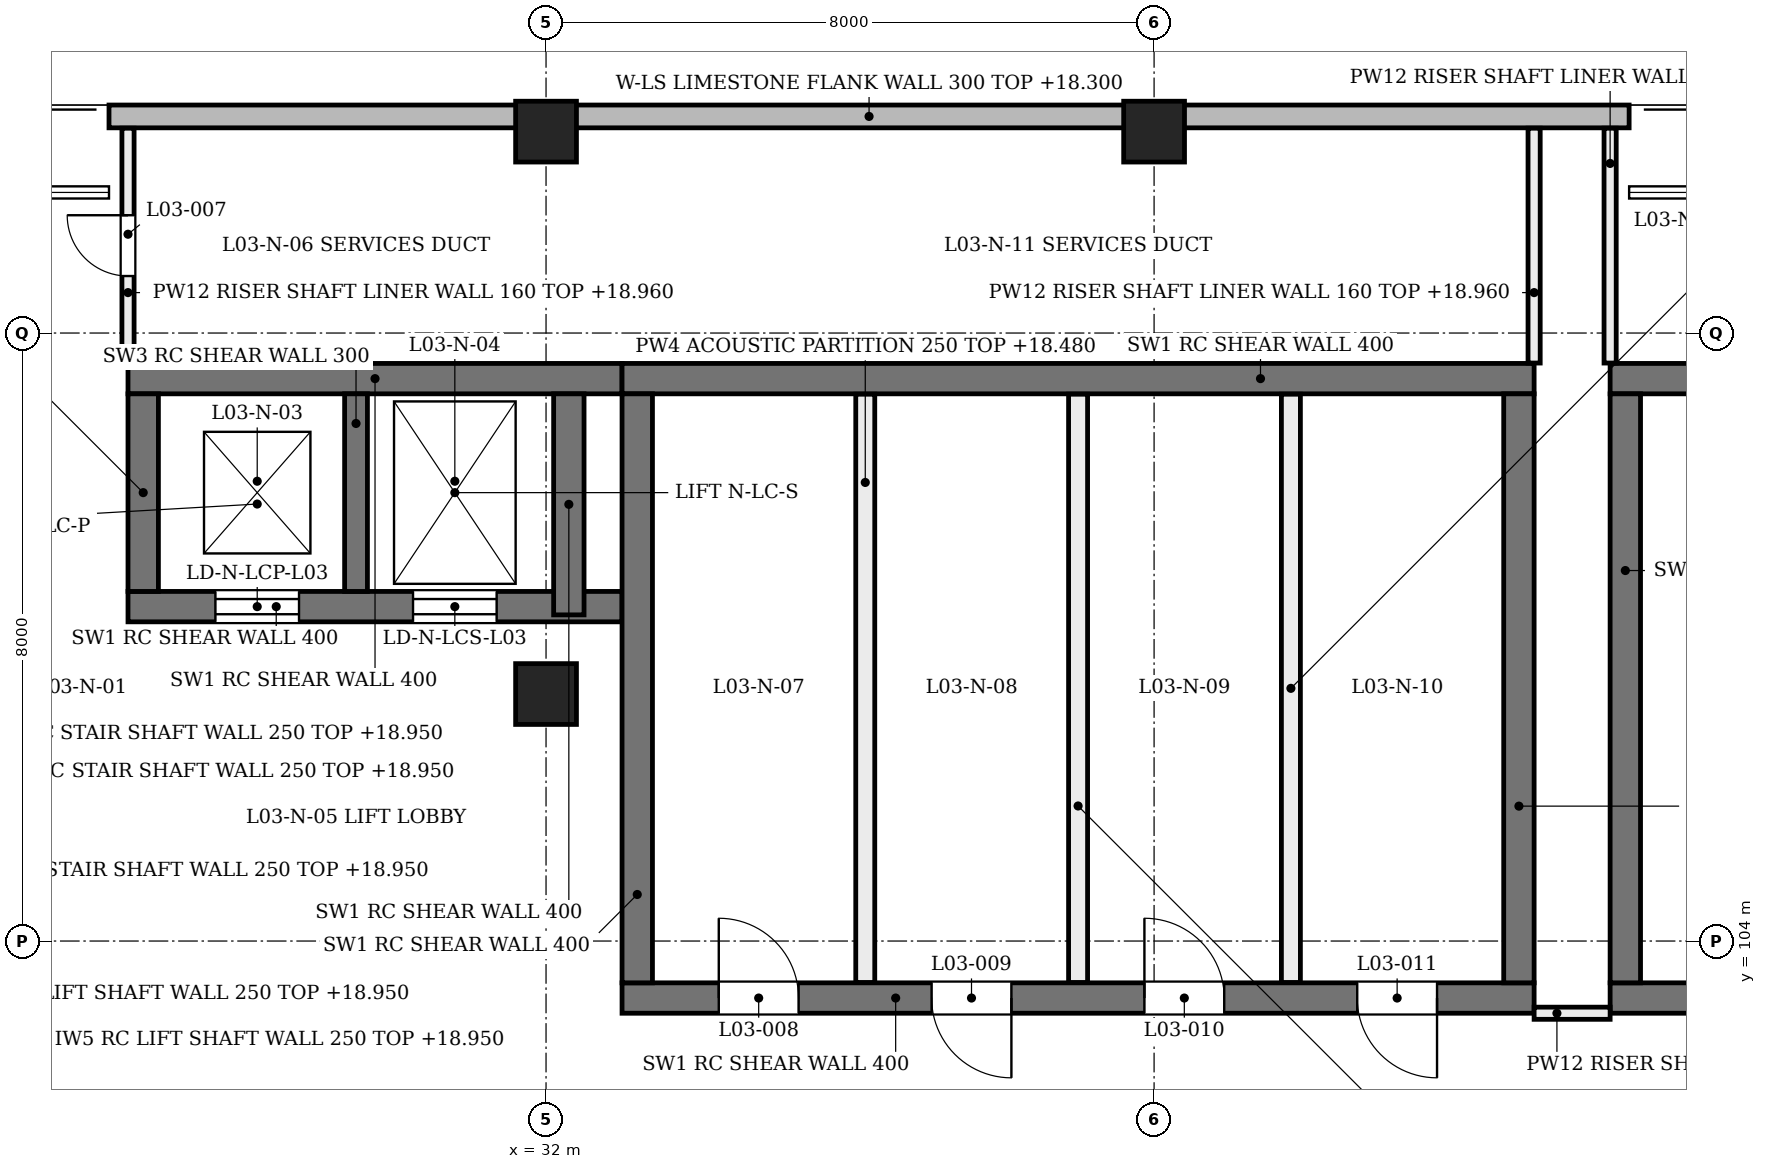
"""IFC4 building model, lengths in metres.
Left out: names, types, materials, properties, quantities, classifications, styles, units other than length and angle.
Written with IfcOpenShell. Run it as: python <this file> out.ifc"""

import sys

from ifc_helpers import new_model, si_unit, direction, frame, frame_2d, origin, origin_2d, place, context, subcontext, project, spatial, rectangle, extrude, element, fill, save


model = new_model("IFC4")
c1 = context("Model", 3, precision=1e-05, world=origin(), true_north=direction((0.0, 1.0)))
c2 = subcontext(c1, "Body", "Model", "MODEL_VIEW")
j1 = project(units=[si_unit("LENGTHUNIT", "METRE"), si_unit("PLANEANGLEUNIT", "RADIAN")], contexts=[c1])
p1 = place(None, origin())
s1 = spatial("IfcSite", under=j1, at=p1, CompositionType="ELEMENT")
p2 = place(p1, origin())
s2 = spatial("IfcBuilding", under=s1, at=p2, CompositionType="ELEMENT")
p3 = place(p2, frame((0.0, 0.0, 14.4)))
s3 = spatial("IfcBuildingStorey", under=s2, at=p3, CompositionType="ELEMENT", Elevation=14.4)
p4 = place(p3, frame((26.5, 108.4, 0.0), z_axis=(0.0, 0.0, 1.0), x_axis=(1.0, 0.0, 0.0)))
e1 = element("IfcWall", 1, at=p4, inside=s3, PredefinedType="SHEAR", context=c2, shape_type="SweptSolid", body=[
    extrude(rectangle(XDim=6.5, YDim=0.4, at=frame_2d((3.25, 0.0))), origin(), (0.0, 0.0, 1.0), 4.58),
])
p5 = place(p4, frame((1.15, 0.0, 0.0)))
e2 = element("IfcOpeningElement", 2, at=p5, cuts=e1, PredefinedType="OPENING", context=c2, shape_type="SweptSolid", body=[
    extrude(rectangle(XDim=1.1, YDim=2.1, at=frame_2d((0.55, 1.05))), frame((0.0, 0.21, 0.0), z_axis=(0.0, -1.0, 0.0), x_axis=(1.0, 0.0, 0.0)), (0.0, 0.0, 1.0), 0.42),
])
p6 = place(p4, frame((3.75, 0.0, 0.0)))
e3 = element("IfcOpeningElement", 3, at=p6, cuts=e1, PredefinedType="OPENING", context=c2, shape_type="SweptSolid", body=[
    extrude(rectangle(XDim=1.1, YDim=2.1, at=frame_2d((0.55, 1.05))), frame((0.0, 0.21, 0.0), z_axis=(0.0, -1.0, 0.0), x_axis=(1.0, 0.0, 0.0)), (0.0, 0.0, 1.0), 0.42),
])
p7 = place(p3, frame((26.5, 111.4, 0.0), z_axis=(0.0, 0.0, 1.0), x_axis=(1.0, 0.0, 0.0)))
e4 = element("IfcWall", 4, at=p7, inside=s3, PredefinedType="SHEAR", context=c2, shape_type="SweptSolid", body=[
    extrude(rectangle(XDim=6.5, YDim=0.4, at=frame_2d((3.25, 0.0))), origin(), (0.0, 0.0, 1.0), 4.58),
])
p8 = place(p3, frame((26.7, 108.6, 0.0), z_axis=(0.0, 0.0, 1.0), x_axis=(0.0, 1.0, 0.0)))
e5 = element("IfcWall", 5, at=p8, inside=s3, PredefinedType="SHEAR", context=c2, shape_type="SweptSolid", body=[
    extrude(rectangle(XDim=2.6, YDim=0.4, at=frame_2d((1.3, 0.0))), origin(), (0.0, 0.0, 1.0), 4.58),
])
p9 = place(p3, frame((32.3, 108.292, 0.0), z_axis=(0.0, 0.0, 1.0), x_axis=(0.0, 1.0, 0.0)))
e6 = element("IfcWall", 6, at=p9, inside=s3, PredefinedType="SHEAR", context=c2, shape_type="SweptSolid", body=[
    extrude(rectangle(XDim=2.908, YDim=0.4, at=frame_2d((1.454, 0.0))), origin(), (0.0, 0.0, 1.0), 4.58),
])
p10 = place(p3, frame((29.5, 108.6, 0.0), z_axis=(0.0, 0.0, 1.0), x_axis=(0.0, 1.0, 0.0)))
e7 = element("IfcWall", 7, at=p10, inside=s3, PredefinedType="SHEAR", context=c2, shape_type="SweptSolid", body=[
    extrude(rectangle(XDim=2.6, YDim=0.3, at=frame_2d((1.3, 0.0))), origin(), (0.0, 0.0, 1.0), 4.58),
])
p11 = place(p3, frame((33.0, 103.25, 0.0), z_axis=(0.0, 0.0, 1.0), x_axis=(1.0, 0.0, 0.0)))
e8 = element("IfcWall", 8, at=p11, inside=s3, PredefinedType="SHEAR", context=c2, shape_type="SweptSolid", body=[
    extrude(rectangle(XDim=12.0, YDim=0.4, at=frame_2d((6.0, 0.0))), origin(), (0.0, 0.0, 1.0), 4.58),
])
p12 = place(p11, frame((1.273, 0.0, 0.0)))
e9 = element("IfcOpeningElement", 9, at=p12, cuts=e8, PredefinedType="OPENING", context=c2, shape_type="SweptSolid", body=[
    extrude(rectangle(XDim=1.05, YDim=2.2, at=frame_2d((0.525, 1.1))), frame((0.0, 0.21, 0.0), z_axis=(0.0, -1.0, 0.0), x_axis=(1.0, 0.0, 0.0)), (0.0, 0.0, 1.0), 0.42),
])
p13 = place(p11, frame((4.073, 0.0, 0.0)))
e10 = element("IfcOpeningElement", 10, at=p13, cuts=e8, PredefinedType="OPENING", context=c2, shape_type="SweptSolid", body=[
    extrude(rectangle(XDim=1.05, YDim=2.2, at=frame_2d((0.525, 1.1))), frame((0.0, 0.21, 0.0), z_axis=(0.0, -1.0, 0.0), x_axis=(1.0, 0.0, 0.0)), (0.0, 0.0, 1.0), 0.42),
])
p14 = place(p11, frame((6.873, 0.0, 0.0)))
e11 = element("IfcOpeningElement", 11, at=p14, cuts=e8, PredefinedType="OPENING", context=c2, shape_type="SweptSolid", body=[
    extrude(rectangle(XDim=1.05, YDim=2.2, at=frame_2d((0.525, 1.1))), frame((0.0, 0.21, 0.0), z_axis=(0.0, -1.0, 0.0), x_axis=(1.0, 0.0, 0.0)), (0.0, 0.0, 1.0), 0.42),
])
p15 = place(p11, frame((9.673, 0.0, 0.0)))
e12 = element("IfcOpeningElement", 12, at=p15, cuts=e8, PredefinedType="OPENING", context=c2, shape_type="SweptSolid", body=[
    extrude(rectangle(XDim=1.05, YDim=2.2, at=frame_2d((0.525, 1.1))), frame((0.0, 0.21, 0.0), z_axis=(0.0, -1.0, 0.0), x_axis=(1.0, 0.0, 0.0)), (0.0, 0.0, 1.0), 0.42),
])
p16 = place(p3, frame((33.0, 111.4, 0.0), z_axis=(0.0, 0.0, 1.0), x_axis=(1.0, 0.0, 0.0)))
e13 = element("IfcWall", 13, at=p16, inside=s3, PredefinedType="SHEAR", context=c2, shape_type="SweptSolid", body=[
    extrude(rectangle(XDim=12.0, YDim=0.4, at=frame_2d((6.0, 0.0))), origin(), (0.0, 0.0, 1.0), 4.58),
])
for number, where, z_axis, x_axis in (
    (14, (33.2, 103.45, 0.0), (0.0, 0.0, 1.0), (0.0, 1.0, 0.0)),
    (15, (44.8, 103.45, 0.0), (0.0, 0.0, 1.0), (0.0, 1.0, 0.0)),
):
    element("IfcWall", number, at=place(p3, frame(where, z_axis=z_axis, x_axis=x_axis)), inside=s3, PredefinedType="SHEAR", context=c2, shape_type="SweptSolid", body=[
        extrude(rectangle(XDim=7.75, YDim=0.4, at=frame_2d((3.875, 0.0))), origin(), (0.0, 0.0, 1.0), 4.58),
    ])
p17 = place(p3, frame((46.0, 103.25, 0.0), z_axis=(0.0, 0.0, 1.0), x_axis=(1.0, 0.0, 0.0)))
e16 = element("IfcWall", 16, at=p17, inside=s3, PredefinedType="SHEAR", context=c2, shape_type="SweptSolid", body=[
    extrude(rectangle(XDim=10.0, YDim=0.4, at=frame_2d((5.0, 0.0))), origin(), (0.0, 0.0, 1.0), 4.58),
])
p18 = place(p17, frame((2.025, 0.0, 0.0)))
e17 = element("IfcOpeningElement", 17, at=p18, cuts=e16, PredefinedType="OPENING", context=c2, shape_type="SweptSolid", body=[
    extrude(rectangle(XDim=1.2, YDim=2.2, at=frame_2d((0.6, 1.1))), frame((0.0, 0.21, 0.0), z_axis=(0.0, -1.0, 0.0), x_axis=(1.0, 0.0, 0.0)), (0.0, 0.0, 1.0), 0.42),
])
p19 = place(p17, frame((6.625, 0.0, 0.0)))
e18 = element("IfcOpeningElement", 18, at=p19, cuts=e16, PredefinedType="OPENING", context=c2, shape_type="SweptSolid", body=[
    extrude(rectangle(XDim=1.2, YDim=2.2, at=frame_2d((0.6, 1.1))), frame((0.0, 0.21, 0.0), z_axis=(0.0, -1.0, 0.0), x_axis=(1.0, 0.0, 0.0)), (0.0, 0.0, 1.0), 0.42),
])
p20 = place(p3, frame((46.0, 111.4, 0.0), z_axis=(0.0, 0.0, 1.0), x_axis=(1.0, 0.0, 0.0)))
e19 = element("IfcWall", 19, at=p20, inside=s3, PredefinedType="SHEAR", context=c2, shape_type="SweptSolid", body=[
    extrude(rectangle(XDim=10.0, YDim=0.4, at=frame_2d((5.0, 0.0))), origin(), (0.0, 0.0, 1.0), 4.58),
])
p21 = place(p3, frame((46.2, 103.45, 0.0), z_axis=(0.0, 0.0, 1.0), x_axis=(0.0, 1.0, 0.0)))
e20 = element("IfcWall", 20, at=p21, inside=s3, PredefinedType="SHEAR", context=c2, shape_type="SweptSolid", body=[
    extrude(rectangle(XDim=7.75, YDim=0.4, at=frame_2d((3.875, 0.0))), origin(), (0.0, 0.0, 1.0), 4.58),
])
for number, where, z_axis, x_axis in (
    (21, (32.0, 107.0, 0.0), (0.0, 0.204, 0.979), (-1.0, 0.0, 0.0)),
    (22, (32.0, 114.4, 0.0), (0.0, 0.204, 0.979), (-1.0, 0.0, 0.0)),
    (23, (40.0, 114.4, 0.0), (0.0, 0.204, 0.979), (-1.0, 0.0, 0.0)),
):
    element("IfcColumn", number, at=place(p3, frame(where, z_axis=z_axis, x_axis=x_axis)), inside=s3, PredefinedType="COLUMN", context=c2, shape_type="SweptSolid", body=[
        extrude(rectangle(XDim=0.8, YDim=0.8, at=origin_2d()), origin(), (0.0, 0.0, 1.0), 4.903),
    ])
p22 = place(p3, frame((26.25, 114.85, 0.0), z_axis=(0.0, 0.0, 1.0), x_axis=(1.0, 0.0, 0.0)))
e24 = element("IfcWall", 24, at=p22, inside=s3, PredefinedType="SOLIDWALL", context=c2, shape_type="SweptSolid", body=[
    extrude(rectangle(XDim=20.0, YDim=0.3, at=frame_2d((10.0, 0.0))), origin(), (0.0, 0.0, 1.0), 3.9),
])
p23 = place(p3, frame((26.5, 111.605, 0.0), z_axis=(0.0, 0.0, 1.0), x_axis=(0.0, 1.0, 0.0)))
e25 = element("IfcWall", 25, at=p23, inside=s3, PredefinedType="PARTITIONING", context=c2, shape_type="SweptSolid", body=[
    extrude(rectangle(XDim=3.09, YDim=0.16, at=frame_2d((1.545, 0.0))), origin(), (0.0, 0.0, 1.0), 4.56),
])
p24 = place(p23, frame((1.145, 0.0, 0.0)))
e26 = element("IfcOpeningElement", 26, at=p24, cuts=e25, PredefinedType="OPENING", context=c2, shape_type="SweptSolid", body=[
    extrude(rectangle(XDim=0.8, YDim=2.1, at=frame_2d((0.4, 1.05))), frame((0.0, 0.09, 0.0), z_axis=(0.0, -1.0, 0.0), x_axis=(1.0, 0.0, 0.0)), (0.0, 0.0, 1.0), 0.18),
])
for number, where, z_axis, x_axis in (
    (27, (36.2, 103.455, 0.0), (0.0, 0.0, 1.0), (0.0, 1.0, 0.0)),
    (28, (39.0, 103.455, 0.0), (0.0, 0.0, 1.0), (0.0, 1.0, 0.0)),
    (29, (41.8, 103.455, 0.0), (0.0, 0.0, 1.0), (0.0, 1.0, 0.0)),
):
    element("IfcWall", number, at=place(p3, frame(where, z_axis=z_axis, x_axis=x_axis)), inside=s3, PredefinedType="PARTITIONING", context=c2, shape_type="SweptSolid", body=[
        extrude(rectangle(XDim=7.74, YDim=0.25, at=frame_2d((3.87, 0.0))), origin(), (0.0, 0.0, 1.0), 4.08),
    ])
for number, where, z_axis, x_axis in (
    (30, (45.0, 111.605, 0.0), (0.0, 0.0, 1.0), (0.0, 1.0, 0.0)),
    (31, (46.0, 111.605, 0.0), (0.0, 0.0, 1.0), (0.0, 1.0, 0.0)),
):
    element("IfcWall", number, at=place(p3, frame(where, z_axis=z_axis, x_axis=x_axis)), inside=s3, PredefinedType="PARTITIONING", context=c2, shape_type="SweptSolid", body=[
        extrude(rectangle(XDim=3.09, YDim=0.16, at=frame_2d((1.545, 0.0))), origin(), (0.0, 0.0, 1.0), 4.56),
    ])
p25 = place(p3, frame((45.0, 103.05, 0.0), z_axis=(0.0, 0.0, 1.0), x_axis=(1.0, 0.0, 0.0)))
e32 = element("IfcWall", 32, at=p25, inside=s3, PredefinedType="PARTITIONING", context=c2, shape_type="SweptSolid", body=[
    extrude(rectangle(XDim=1.0, YDim=0.16, at=frame_2d((0.5, 0.0))), origin(), (0.0, 0.0, 1.0), 4.56),
])
p26 = place(p5, frame((1.1, 0.0, 0.0), z_axis=(0.0, 0.0, 1.0), x_axis=(-1.0, 0.0, 0.0)))
e33 = element("IfcDoor", 33, at=p26, inside=s3, OperationType="DOUBLE_DOOR_SLIDING", PredefinedType="DOOR", context=c2, shape_type="SweptSolid", body=[
    extrude(rectangle(XDim=1.1, YDim=2.1, at=frame_2d((0.55, 1.05))), frame((0.0, 0.025, 0.0), z_axis=(0.0, -1.0, 0.0), x_axis=(1.0, 0.0, 0.0)), (0.0, 0.0, 1.0), 0.05),
])
fill(e2, e33)
p27 = place(p6, frame((1.1, 0.0, 0.0), z_axis=(0.0, 0.0, 1.0), x_axis=(-1.0, 0.0, 0.0)))
e34 = element("IfcDoor", 34, at=p27, inside=s3, OperationType="DOUBLE_DOOR_SLIDING", PredefinedType="DOOR", context=c2, shape_type="SweptSolid", body=[
    extrude(rectangle(XDim=1.1, YDim=2.1, at=frame_2d((0.55, 1.05))), frame((0.0, 0.025, 0.0), z_axis=(0.0, -1.0, 0.0), x_axis=(1.0, 0.0, 0.0)), (0.0, 0.0, 1.0), 0.05),
])
fill(e3, e34)
p28 = place(p24, frame((0.8, 0.0, 0.0), z_axis=(0.0, 0.0, 1.0), x_axis=(-1.0, 0.0, 0.0)))
e35 = element("IfcDoor", 35, at=p28, inside=s3, OperationType="SINGLE_SWING_RIGHT", PredefinedType="DOOR", context=c2, shape_type="SweptSolid", body=[
    extrude(rectangle(XDim=0.8, YDim=2.1, at=frame_2d((0.4, 1.05))), frame((0.0, 0.025, 0.0), z_axis=(0.0, -1.0, 0.0), x_axis=(1.0, 0.0, 0.0)), (0.0, 0.0, 1.0), 0.05),
])
fill(e26, e35)
p29 = place(p12, origin())
e36 = element("IfcDoor", 36, at=p29, inside=s3, OperationType="SINGLE_SWING_LEFT", PredefinedType="DOOR", context=c2, shape_type="SweptSolid", body=[
    extrude(rectangle(XDim=1.05, YDim=2.2, at=frame_2d((0.525, 1.1))), frame((0.0, 0.025, 0.0), z_axis=(0.0, -1.0, 0.0), x_axis=(1.0, 0.0, 0.0)), (0.0, 0.0, 1.0), 0.05),
])
fill(e9, e36)
p30 = place(p13, origin())
e37 = element("IfcDoor", 37, at=p30, inside=s3, OperationType="SINGLE_SWING_RIGHT", PredefinedType="DOOR", context=c2, shape_type="SweptSolid", body=[
    extrude(rectangle(XDim=1.05, YDim=2.2, at=frame_2d((0.525, 1.1))), frame((0.0, 0.025, 0.0), z_axis=(0.0, -1.0, 0.0), x_axis=(1.0, 0.0, 0.0)), (0.0, 0.0, 1.0), 0.05),
])
fill(e10, e37)
p31 = place(p14, origin())
e38 = element("IfcDoor", 38, at=p31, inside=s3, OperationType="SINGLE_SWING_LEFT", PredefinedType="DOOR", context=c2, shape_type="SweptSolid", body=[
    extrude(rectangle(XDim=1.05, YDim=2.2, at=frame_2d((0.525, 1.1))), frame((0.0, 0.025, 0.0), z_axis=(0.0, -1.0, 0.0), x_axis=(1.0, 0.0, 0.0)), (0.0, 0.0, 1.0), 0.05),
])
fill(e11, e38)
p32 = place(p15, origin())
e39 = element("IfcDoor", 39, at=p32, inside=s3, OperationType="SINGLE_SWING_RIGHT", PredefinedType="DOOR", context=c2, shape_type="SweptSolid", body=[
    extrude(rectangle(XDim=1.05, YDim=2.2, at=frame_2d((0.525, 1.1))), frame((0.0, 0.025, 0.0), z_axis=(0.0, -1.0, 0.0), x_axis=(1.0, 0.0, 0.0)), (0.0, 0.0, 1.0), 0.05),
])
fill(e12, e39)
save(model, sys.argv[1])
